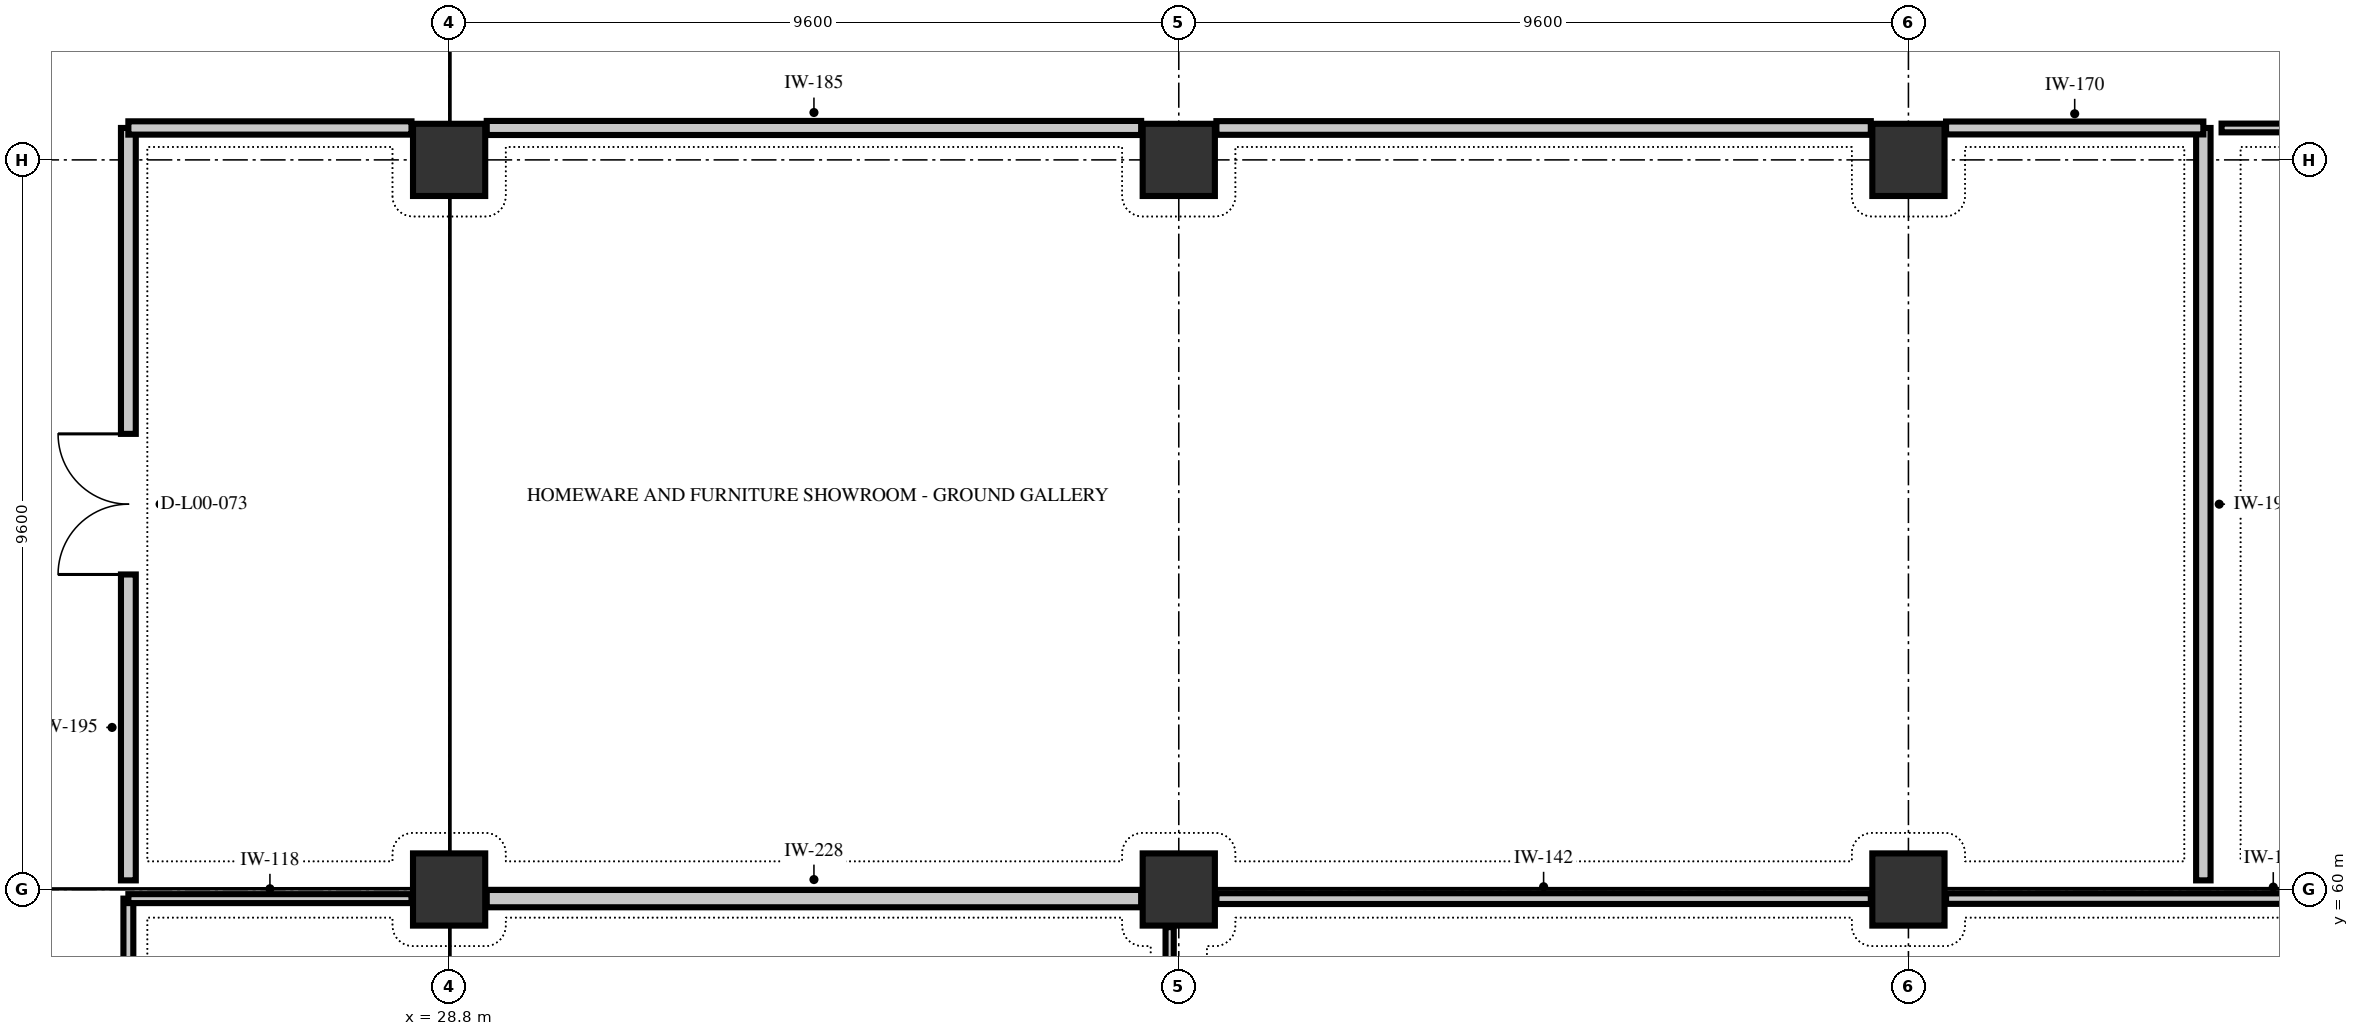
"""IFC4 building model, lengths in metres.
Left out: names, types, materials, properties, quantities, classifications, styles, units other than length and angle.
Written with IfcOpenShell. Run it as: python <this file> out.ifc"""

import sys

from ifc_helpers import new_model, si_unit, direction, frame, frame_2d, origin, origin_2d, place, context, subcontext, project, spatial, rectangle, extrude, element, fill, save


model = new_model("IFC4")
c1 = context("Model", 3, precision=1e-05, world=origin(), true_north=direction((0.0, 1.0)))
c2 = subcontext(c1, "Body", "Model", "MODEL_VIEW")
j1 = project(units=[si_unit("LENGTHUNIT", "METRE"), si_unit("PLANEANGLEUNIT", "RADIAN")], contexts=[c1])
p1 = place(None, origin())
s1 = spatial("IfcSite", under=j1, at=p1, CompositionType="ELEMENT")
p2 = place(p1, origin())
s2 = spatial("IfcBuilding", under=s1, at=p2, CompositionType="ELEMENT")
p3 = place(p2, origin())
s3 = spatial("IfcBuildingStorey", under=s2, at=p3, CompositionType="ELEMENT", Elevation=0.0)
for number, where, z_axis, x_axis in (
    (1, (28.8, 60.0, -0.3), (0.0, 0.0, 1.0), (1.0, 0.0, 0.0)),
    (2, (28.8, 69.6, -0.3), (0.0, 0.0, 1.0), (1.0, 0.0, 0.0)),
    (3, (38.4, 60.0, -0.3), (0.0, 0.0, 1.0), (1.0, 0.0, 0.0)),
    (4, (38.4, 69.6, -0.3), (0.0, 0.0, 1.0), (1.0, 0.0, 0.0)),
    (5, (48.0, 60.0, -0.3), (0.0, 0.0, 1.0), (1.0, 0.0, 0.0)),
    (6, (48.0, 69.6, -0.3), (0.0, 0.0, 1.0), (1.0, 0.0, 0.0)),
):
    element("IfcColumn", number, at=place(p3, frame(where, z_axis=z_axis, x_axis=x_axis)), inside=s3, PredefinedType="COLUMN", context=c2, shape_type="SweptSolid", body=[
        extrude(rectangle(XDim=0.95, YDim=0.95, at=origin_2d()), origin(), (0.0, 0.0, 1.0), 5.7),
    ])
p4 = place(p3, frame((24.58, 43.98, 0.0), z_axis=(0.0, 0.0, 1.0), x_axis=(0.0, 1.0, 0.0)))
e7 = element("IfcWall", 7, at=p4, inside=s3, PredefinedType="PARTITIONING", context=c2, shape_type="SweptSolid", body=[
    extrude(rectangle(XDim=15.9, YDim=0.13, at=frame_2d((7.95, 0.0))), origin(), (0.0, 0.0, 1.0), 4.03),
])
p5 = place(p4, frame((6.99, 0.0, 0.0)))
e8 = element("IfcOpeningElement", 8, at=p5, cuts=e7, PredefinedType="OPENING", context=c2, shape_type="SweptSolid", body=[
    extrude(rectangle(XDim=1.92, YDim=2.38, at=frame_2d((0.96, 1.19))), frame((0.0, 0.077, 0.0), z_axis=(0.0, -1.0, 0.0), x_axis=(1.0, 0.0, 0.0)), (0.0, 0.0, 1.0), 0.154),
])
p6 = place(p3, frame((24.58, 59.88, 0.0), z_axis=(0.0, 0.0, 1.0), x_axis=(1.0, 0.0, 0.0)))
e9 = element("IfcWall", 9, at=p6, inside=s3, PredefinedType="PARTITIONING", context=c2, shape_type="SweptSolid", body=[
    extrude(rectangle(XDim=3.725, YDim=0.118, at=frame_2d((1.862, 0.0))), origin(), (0.0, 0.0, 1.0), 3.33),
])
p7 = place(p3, frame((38.28, 59.505, 0.0), z_axis=(0.0, 0.0, 1.0), x_axis=(0.0, -1.0, 0.0)))
e10 = element("IfcWall", 10, at=p7, inside=s3, PredefinedType="PARTITIONING", context=c2, shape_type="SweptSolid", body=[
    extrude(rectangle(XDim=9.81, YDim=0.108, at=frame_2d((4.905, 0.0))), origin(), (0.0, 0.0, 1.0), 4.03),
])
p8 = place(p3, frame((29.295, 59.88, 0.0), z_axis=(0.0, 0.0, 1.0), x_axis=(1.0, 0.0, 0.0)))
e11 = element("IfcWall", 11, at=p8, inside=s3, PredefinedType="PARTITIONING", context=c2, shape_type="SweptSolid", body=[
    extrude(rectangle(XDim=8.61, YDim=0.228, at=frame_2d((4.305, 0.0))), origin(), (0.0, 0.0, 1.0), 4.03),
])
p9 = place(p3, frame((38.895, 59.88, 0.0), z_axis=(0.0, 0.0, 1.0), x_axis=(1.0, 0.0, 0.0)))
e12 = element("IfcWall", 12, at=p9, inside=s3, PredefinedType="PARTITIONING", context=c2, shape_type="SweptSolid", body=[
    extrude(rectangle(XDim=8.61, YDim=0.142, at=frame_2d((4.305, 0.0))), origin(), (0.0, 0.0, 1.0), 4.03),
])
p10 = place(p3, frame((48.495, 59.88, 0.0), z_axis=(0.0, 0.0, 1.0), x_axis=(1.0, 0.0, 0.0)))
e13 = element("IfcWall", 13, at=p10, inside=s3, PredefinedType="PARTITIONING", context=c2, shape_type="SweptSolid", body=[
    extrude(rectangle(XDim=8.61, YDim=0.138, at=frame_2d((4.305, 0.0))), origin(), (0.0, 0.0, 1.0), 4.03),
])
p11 = place(p3, frame((24.58, 60.12, 0.0), z_axis=(0.0, 0.0, 1.0), x_axis=(0.0, 1.0, 0.0)))
e14 = element("IfcWall", 14, at=p11, inside=s3, PredefinedType="PARTITIONING", context=c2, shape_type="SweptSolid", body=[
    extrude(rectangle(XDim=9.9, YDim=0.195, at=frame_2d((4.95, 0.0))), origin(), (0.0, 0.0, 1.0), 4.03),
])
p12 = place(p11, frame((4.025, 0.0, 0.0)))
e15 = element("IfcOpeningElement", 15, at=p12, cuts=e14, PredefinedType="OPENING", context=c2, shape_type="SweptSolid", body=[
    extrude(rectangle(XDim=1.85, YDim=2.35, at=frame_2d((0.925, 1.175))), frame((0.0, 0.109, 0.0), z_axis=(0.0, -1.0, 0.0), x_axis=(1.0, 0.0, 0.0)), (0.0, 0.0, 1.0), 0.219),
])
p13 = place(p3, frame((51.88, 70.02, 0.0), z_axis=(0.0, 0.0, 1.0), x_axis=(0.0, -1.0, 0.0)))
e16 = element("IfcWall", 16, at=p13, inside=s3, PredefinedType="PARTITIONING", context=c2, shape_type="SweptSolid", body=[
    extrude(rectangle(XDim=9.9, YDim=0.19, at=frame_2d((4.95, 0.0))), origin(), (0.0, 0.0, 1.0), 4.03),
])
p14 = place(p3, frame((29.295, 70.02, 0.0), z_axis=(0.0, 0.0, 1.0), x_axis=(1.0, 0.0, 0.0)))
e17 = element("IfcWall", 17, at=p14, inside=s3, PredefinedType="PARTITIONING", context=c2, shape_type="SweptSolid", body=[
    extrude(rectangle(XDim=8.61, YDim=0.185, at=frame_2d((4.305, 0.0))), origin(), (0.0, 0.0, 1.0), 5.09),
])
p15 = place(p3, frame((38.895, 70.02, 0.0), z_axis=(0.0, 0.0, 1.0), x_axis=(1.0, 0.0, 0.0)))
e18 = element("IfcWall", 18, at=p15, inside=s3, PredefinedType="PARTITIONING", context=c2, shape_type="SweptSolid", body=[
    extrude(rectangle(XDim=8.61, YDim=0.18, at=frame_2d((4.305, 0.0))), origin(), (0.0, 0.0, 1.0), 5.09),
])
p16 = place(p3, frame((24.58, 70.02, 0.0), z_axis=(0.0, 0.0, 1.0), x_axis=(1.0, 0.0, 0.0)))
e19 = element("IfcWall", 19, at=p16, inside=s3, PredefinedType="PARTITIONING", context=c2, shape_type="SweptSolid", body=[
    extrude(rectangle(XDim=3.725, YDim=0.175, at=frame_2d((1.862, 0.0))), origin(), (0.0, 0.0, 1.0), 5.09),
])
p17 = place(p3, frame((48.495, 70.02, 0.0), z_axis=(0.0, 0.0, 1.0), x_axis=(1.0, 0.0, 0.0)))
e20 = element("IfcWall", 20, at=p17, inside=s3, PredefinedType="PARTITIONING", context=c2, shape_type="SweptSolid", body=[
    extrude(rectangle(XDim=3.385, YDim=0.17, at=frame_2d((1.692, 0.0))), origin(), (0.0, 0.0, 1.0), 5.09),
])
p18 = place(p3, frame((52.12, 70.02, 0.0), z_axis=(0.0, 0.0, 1.0), x_axis=(1.0, 0.0, 0.0)))
e21 = element("IfcWall", 21, at=p18, inside=s3, PredefinedType="PARTITIONING", context=c2, shape_type="SweptSolid", body=[
    extrude(rectangle(XDim=4.614, YDim=0.115, at=frame_2d((2.307, 0.0))), origin(), (0.0, 0.0, 1.0), 5.09),
])
p19 = place(p12, origin())
e22 = element("IfcDoor", 22, at=p19, inside=s3, OperationType="DOUBLE_DOOR_SINGLE_SWING", PredefinedType="DOOR", context=c2, shape_type="SweptSolid", body=[
    extrude(rectangle(XDim=1.85, YDim=2.35, at=frame_2d((0.925, 1.175))), frame((0.0, 0.025, 0.0), z_axis=(0.0, -1.0, 0.0), x_axis=(1.0, 0.0, 0.0)), (0.0, 0.0, 1.0), 0.05),
])
fill(e15, e22)
save(model, sys.argv[1])
